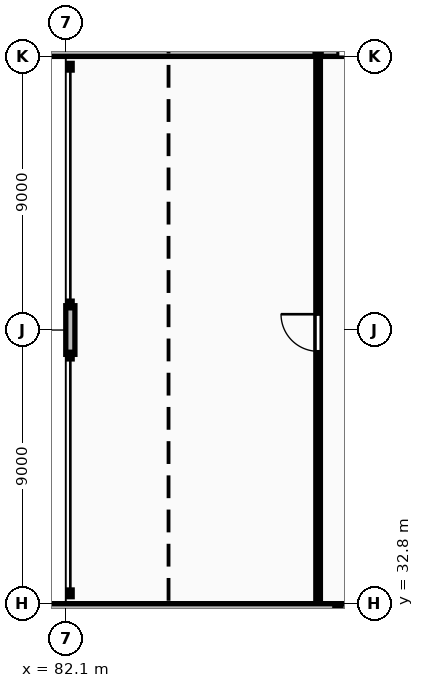
"""IFC4 building model, lengths in metres.
Left out: names, types, materials, properties, quantities, classifications, styles, units other than length and angle.
Written with IfcOpenShell. Run it as: python <this file> out.ifc"""

import sys

from ifc_helpers import new_model, si_unit, direction, frame, frame_2d, origin, place, context, subcontext, project, spatial, rectangle, extrude, element, fill, save


model = new_model("IFC4")
c1 = context("Model", 3, precision=1e-05, world=origin(), true_north=direction((0.0, 1.0)))
c2 = subcontext(c1, "Body", "Model", "MODEL_VIEW")
j1 = project(units=[si_unit("LENGTHUNIT", "METRE"), si_unit("PLANEANGLEUNIT", "RADIAN")], contexts=[c1])
p1 = place(None, origin())
s1 = spatial("IfcSite", under=j1, at=p1, CompositionType="ELEMENT")
p2 = place(p1, origin())
s2 = spatial("IfcBuilding", under=s1, at=p2, CompositionType="ELEMENT")
p3 = place(p2, frame((0.0, 0.0, 150.1)))
s3 = spatial("IfcBuildingStorey", under=s2, at=p3, CompositionType="ELEMENT", Elevation=150.1)
p4 = place(p3, frame((57.6, 50.95, 0.0), z_axis=(0.0, 0.0, 1.0), x_axis=(1.0, 0.0, 0.0)))
e1 = element("IfcWall", 1, at=p4, inside=s3, PredefinedType="STANDARD", context=c2, shape_type="SweptSolid", body=[
    extrude(rectangle(XDim=73.0, YDim=0.3, at=frame_2d((36.5, 0.0))), origin(), (0.0, 0.0, 1.0), 3.31),
])
p5 = place(p4, frame((15.225, 0.0, 0.85)))
e2 = element("IfcOpeningElement", 2, at=p5, cuts=e1, PredefinedType="OPENING", context=c2, shape_type="SweptSolid", body=[
    extrude(rectangle(XDim=1.8, YDim=1.8, at=frame_2d((0.9, 0.9))), frame((0.0, 0.16, 0.0), z_axis=(0.0, -1.0, 0.0), x_axis=(1.0, 0.0, 0.0)), (0.0, 0.0, 1.0), 0.32),
])
p6 = place(p4, frame((58.575, 0.0, 0.85)))
e3 = element("IfcOpeningElement", 3, at=p6, cuts=e1, PredefinedType="OPENING", context=c2, shape_type="SweptSolid", body=[
    extrude(rectangle(XDim=1.8, YDim=1.8, at=frame_2d((0.9, 0.9))), frame((0.0, 0.16, 0.0), z_axis=(0.0, -1.0, 0.0), x_axis=(1.0, 0.0, 0.0)), (0.0, 0.0, 1.0), 0.32),
])
p7 = place(p4, frame((33.45, 0.0, 0.0)))
e4 = element("IfcOpeningElement", 4, at=p7, cuts=e1, PredefinedType="OPENING", context=c2, shape_type="SweptSolid", body=[
    extrude(rectangle(XDim=1.1, YDim=2.1, at=frame_2d((0.55, 1.05))), frame((0.0, 0.16, 0.0), z_axis=(0.0, -1.0, 0.0), x_axis=(1.0, 0.0, 0.0)), (0.0, 0.0, 1.0), 0.32),
])
p8 = place(p3, frame((130.7, 32.65, 0.0), z_axis=(0.0, 0.0, 1.0), x_axis=(-1.0, 0.0, 0.0)))
e5 = element("IfcWall", 5, at=p8, inside=s3, PredefinedType="STANDARD", context=c2, shape_type="SweptSolid", body=[
    extrude(rectangle(XDim=58.0, YDim=0.3, at=frame_2d((29.0, 0.0))), origin(), (0.0, 0.0, 1.0), 3.31),
])
p9 = place(p8, frame((50.125, 0.0, 0.85)))
e6 = element("IfcOpeningElement", 6, at=p9, cuts=e5, PredefinedType="OPENING", context=c2, shape_type="SweptSolid", body=[
    extrude(rectangle(XDim=1.8, YDim=1.8, at=frame_2d((0.9, 0.9))), frame((0.0, 0.16, 0.0), z_axis=(0.0, -1.0, 0.0), x_axis=(1.0, 0.0, 0.0)), (0.0, 0.0, 1.0), 0.32),
])
p10 = place(p8, frame((6.775, 0.0, 0.85)))
e7 = element("IfcOpeningElement", 7, at=p10, cuts=e5, PredefinedType="OPENING", context=c2, shape_type="SweptSolid", body=[
    extrude(rectangle(XDim=1.8, YDim=1.8, at=frame_2d((0.9, 0.9))), frame((0.0, 0.16, 0.0), z_axis=(0.0, -1.0, 0.0), x_axis=(1.0, 0.0, 0.0)), (0.0, 0.0, 1.0), 0.32),
])
p11 = place(p8, frame((38.0, 0.0, 0.0)))
e8 = element("IfcOpeningElement", 8, at=p11, cuts=e5, PredefinedType="OPENING", context=c2, shape_type="SweptSolid", body=[
    extrude(rectangle(XDim=1.1, YDim=2.1, at=frame_2d((0.55, 1.05))), frame((0.0, 0.16, 0.0), z_axis=(0.0, -1.0, 0.0), x_axis=(1.0, 0.0, 0.0)), (0.0, 0.0, 1.0), 0.32),
])
p12 = place(p3, frame((82.25, 41.0, 0.0), z_axis=(0.0, 0.0, 1.0), x_axis=(0.0, 1.0, 0.0)))
e9 = element("IfcWall", 9, at=p12, inside=s3, PredefinedType="STANDARD", context=c2, shape_type="SweptSolid", body=[
    extrude(rectangle(XDim=1.6, YDim=0.3, at=frame_2d((0.8, 0.0))), origin(), (0.0, 0.0, 1.0), 2.38),
])
p13 = place(p3, frame((90.4, 50.85, 0.0), z_axis=(0.0, 0.0, 1.0), x_axis=(0.0, 1.0, 0.0)))
e10 = element("IfcWall", 10, at=p13, inside=s3, PredefinedType="PARTITIONING", context=c2, shape_type="SweptSolid", body=[
    extrude(rectangle(XDim=4.2, YDim=0.2, at=frame_2d((2.1, 0.0))), origin(), (0.0, 0.0, 1.0), 3.31),
])
p14 = place(p3, frame((91.05, 30.55, 0.0), z_axis=(0.0, 0.0, 1.0), x_axis=(0.0, 1.0, 0.0)))
e11 = element("IfcWall", 11, at=p14, inside=s3, PredefinedType="PARTITIONING", context=c2, shape_type="SweptSolid", body=[
    extrude(rectangle(XDim=2.2, YDim=0.2, at=frame_2d((1.1, 0.0))), origin(), (0.0, 0.0, 1.0), 3.31),
])
p15 = place(p3, frame((90.4, 32.9, 0.0), z_axis=(0.0, 0.0, 1.0), x_axis=(0.0, 1.0, 0.0)))
e12 = element("IfcWall", 12, at=p15, inside=s3, PredefinedType="PARTITIONING", context=c2, shape_type="SweptSolid", body=[
    extrude(rectangle(XDim=17.8, YDim=0.15, at=frame_2d((8.9, 0.0))), origin(), (0.0, 0.0, 1.0), 3.31),
])
p16 = place(p15, frame((8.2, 0.0, 0.0)))
e13 = element("IfcOpeningElement", 13, at=p16, cuts=e12, PredefinedType="OPENING", context=c2, shape_type="SweptSolid", body=[
    extrude(rectangle(XDim=1.22, YDim=2.18, at=frame_2d((0.61, 1.09))), frame((0.0, 0.085, 0.0), z_axis=(0.0, -1.0, 0.0), x_axis=(1.0, 0.0, 0.0)), (0.0, 0.0, 1.0), 0.17),
])
p17 = place(p7, origin())
e14 = element("IfcDoor", 14, at=p17, inside=s3, OperationType="SINGLE_SWING_LEFT", PredefinedType="DOOR", context=c2, shape_type="SweptSolid", body=[
    extrude(rectangle(XDim=1.1, YDim=2.1, at=frame_2d((0.55, 1.05))), frame((0.0, 0.025, 0.0), z_axis=(0.0, -1.0, 0.0), x_axis=(1.0, 0.0, 0.0)), (0.0, 0.0, 1.0), 0.05),
])
fill(e4, e14)
p18 = place(p16, origin())
e15 = element("IfcDoor", 15, at=p18, inside=s3, OperationType="SINGLE_SWING_RIGHT", PredefinedType="DOOR", context=c2, shape_type="SweptSolid", body=[
    extrude(rectangle(XDim=1.22, YDim=2.18, at=frame_2d((0.61, 1.09))), frame((0.0, 0.025, 0.0), z_axis=(0.0, -1.0, 0.0), x_axis=(1.0, 0.0, 0.0)), (0.0, 0.0, 1.0), 0.05),
])
fill(e13, e15)
save(model, sys.argv[1])
